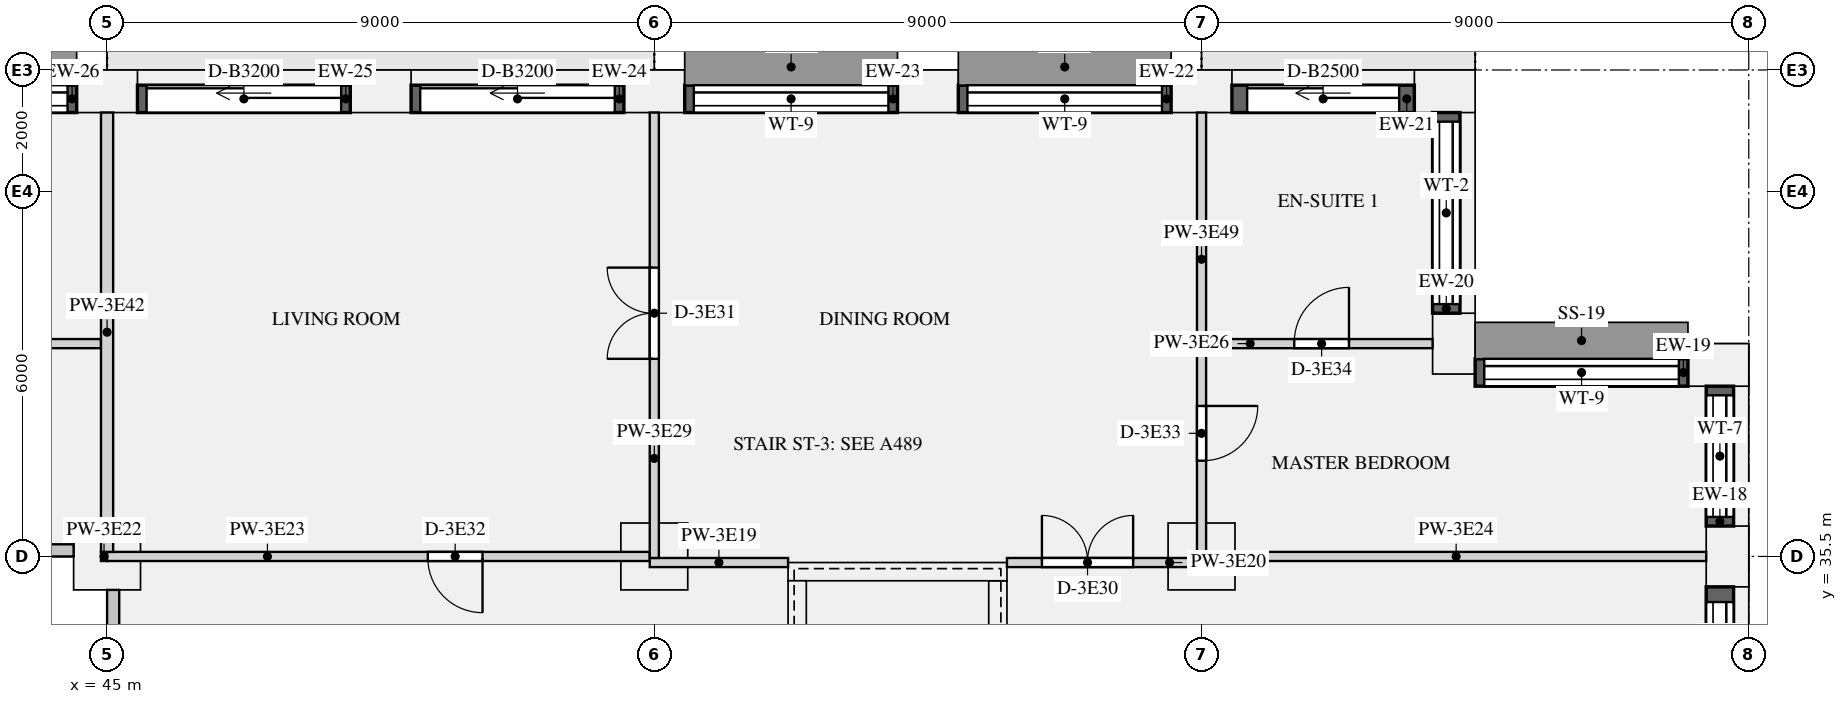
"""IFC4 building model, lengths in metres.
Left out: names, types, materials, properties, quantities, classifications, styles, units other than length and angle.
Written with IfcOpenShell. Run it as: python <this file> out.ifc"""

import sys

from ifc_helpers import new_model, si_unit, direction, frame, frame_2d, origin, origin_2d, place, context, subcontext, project, spatial, rectangle, extrude, element, fill, save


model = new_model("IFC4")
c1 = context("Model", 3, precision=1e-05, world=origin(), true_north=direction((0.0, 1.0)))
c2 = subcontext(c1, "Body", "Model", "MODEL_VIEW")
j1 = project(units=[si_unit("LENGTHUNIT", "METRE"), si_unit("PLANEANGLEUNIT", "RADIAN")], contexts=[c1])
p1 = place(None, origin())
s1 = spatial("IfcSite", under=j1, at=p1, CompositionType="ELEMENT")
p2 = place(p1, origin())
s2 = spatial("IfcBuilding", under=s1, at=p2, CompositionType="ELEMENT")
p3 = place(p2, frame((0.0, 0.0, 172.8)))
s3 = spatial("IfcBuildingStorey", under=s2, at=p3, CompositionType="ELEMENT", Elevation=172.8)
for number, where, z_axis, x_axis in (
    (1, (71.65, 35.5, 0.0), (0.0, 0.0, 1.0), (0.0, 1.0, 0.0)),
    (2, (71.5, 38.65, 0.0), (0.0, 0.0, 1.0), (-1.0, 0.0, 0.0)),
    (3, (67.15, 39.0, 0.0), (0.0, 0.0, 1.0), (0.0, 1.0, 0.0)),
    (4, (67.0, 43.15, 0.0), (0.0, 0.0, 1.0), (-1.0, 0.0, 0.0)),
    (5, (63.0, 43.15, 0.0), (0.0, 0.0, 1.0), (-1.0, 0.0, 0.0)),
    (6, (58.5, 43.15, 0.0), (0.0, 0.0, 1.0), (-1.0, 0.0, 0.0)),
    (7, (54.0, 43.15, 0.0), (0.0, 0.0, 1.0), (-1.0, 0.0, 0.0)),
    (8, (49.5, 43.15, 0.0), (0.0, 0.0, 1.0), (-1.0, 0.0, 0.0)),
    (9, (45.0, 43.15, 0.0), (0.0, 0.0, 1.0), (-1.0, 0.0, 0.0)),
):
    element("IfcColumn", number, at=place(p3, frame(where, z_axis=z_axis, x_axis=x_axis)), inside=s3, PredefinedType="USERDEFINED", context=c2, shape_type="SweptSolid", body=[
        extrude(rectangle(XDim=1.0, YDim=0.7, at=origin_2d()), origin(), (0.0, 0.0, 1.0), 3.15),
    ])
for number, where, z_axis, x_axis in (
    (10, (45.0, 35.5, 0.0), (0.0, 0.0, 1.0), (1.0, 0.0, 0.0)),
    (11, (54.0, 35.5, 0.0), (0.0, 0.0, 1.0), (1.0, 0.0, 0.0)),
    (12, (63.0, 35.5, 0.0), (0.0, 0.0, 1.0), (1.0, 0.0, 0.0)),
):
    element("IfcColumn", number, at=place(p3, frame(where, z_axis=z_axis, x_axis=x_axis)), inside=s3, PredefinedType="COLUMN", context=c2, shape_type="SweptSolid", body=[
        extrude(rectangle(XDim=1.1, YDim=1.1, at=origin_2d()), origin(), (0.0, 0.0, 1.0), 3.15),
    ])
p4 = place(p3, frame((56.2, 35.25, 0.0), z_axis=(0.0, 0.0, 1.0), x_axis=(1.0, 0.0, 0.0)))
e13 = element("IfcWall", 13, at=p4, inside=s3, PredefinedType="SHEAR", context=c2, shape_type="SweptSolid", body=[
    extrude(rectangle(XDim=3.6, YDim=0.3, at=frame_2d((1.8, 0.0))), origin(), (0.0, 0.0, 1.0), 3.15),
])
for number, where, z_axis, x_axis in (
    (14, (56.35, 27.3, 0.0), (0.0, 0.0, 1.0), (0.0, 1.0, 0.0)),
    (15, (59.65, 27.3, 0.0), (0.0, 0.0, 1.0), (0.0, 1.0, 0.0)),
):
    element("IfcWall", number, at=place(p3, frame(where, z_axis=z_axis, x_axis=x_axis)), inside=s3, PredefinedType="SHEAR", context=c2, shape_type="SweptSolid", body=[
        extrude(rectangle(XDim=7.8, YDim=0.3, at=frame_2d((3.9, 0.0))), origin(), (0.0, 0.0, 1.0), 3.15),
    ])
p5 = place(p3, frame((71.525, 32.5, 0.9), z_axis=(0.0, 0.0, 1.0), x_axis=(0.0, 1.0, 0.0)))
e16 = element("IfcWall", 16, at=p5, inside=s3, PredefinedType="SOLIDWALL", context=c2, shape_type="SweptSolid", body=[
    extrude(rectangle(XDim=2.5, YDim=0.45, at=frame_2d((1.25, 0.0))), origin(), (0.0, 0.0, 1.0), 1.93),
])
p6 = place(p5, frame((0.25, 0.0, 0.15)))
e17 = element("IfcOpeningElement", 17, at=p6, cuts=e16, PredefinedType="OPENING", context=c2, shape_type="SweptSolid", body=[
    extrude(rectangle(XDim=2.0, YDim=1.5, at=frame_2d((1.0, 0.75))), frame((0.0, 0.235, 0.0), z_axis=(0.0, -1.0, 0.0), x_axis=(1.0, 0.0, 0.0)), (0.0, 0.0, 1.0), 0.47),
])
p7 = place(p3, frame((71.525, 36.0, 0.9), z_axis=(0.0, 0.0, 1.0), x_axis=(0.0, 1.0, 0.0)))
e18 = element("IfcWall", 18, at=p7, inside=s3, PredefinedType="SOLIDWALL", context=c2, shape_type="SweptSolid", body=[
    extrude(rectangle(XDim=2.3, YDim=0.45, at=frame_2d((1.15, 0.0))), origin(), (0.0, 0.0, 1.0), 1.93),
])
p8 = place(p7, frame((0.15, 0.0, 0.15)))
e19 = element("IfcOpeningElement", 19, at=p8, cuts=e18, PredefinedType="OPENING", context=c2, shape_type="SweptSolid", body=[
    extrude(rectangle(XDim=2.0, YDim=1.5, at=frame_2d((1.0, 0.75))), frame((0.0, 0.235, 0.0), z_axis=(0.0, -1.0, 0.0), x_axis=(1.0, 0.0, 0.0)), (0.0, 0.0, 1.0), 0.47),
])
p9 = place(p3, frame((71.0, 38.525, 0.9), z_axis=(0.0, 0.0, 1.0), x_axis=(-1.0, 0.0, 0.0)))
e20 = element("IfcWall", 20, at=p9, inside=s3, PredefinedType="SOLIDWALL", context=c2, shape_type="SweptSolid", body=[
    extrude(rectangle(XDim=3.5, YDim=0.45, at=frame_2d((1.75, 0.0))), origin(), (0.0, 0.0, 1.0), 1.93),
])
p10 = place(p9, frame((0.15, 0.0, 0.15)))
e21 = element("IfcOpeningElement", 21, at=p10, cuts=e20, PredefinedType="OPENING", context=c2, shape_type="SweptSolid", body=[
    extrude(rectangle(XDim=3.2, YDim=1.5, at=frame_2d((1.6, 0.75))), frame((0.0, 0.235, 0.0), z_axis=(0.0, -1.0, 0.0), x_axis=(1.0, 0.0, 0.0)), (0.0, 0.0, 1.0), 0.47),
])
p11 = place(p3, frame((67.025, 39.5, 0.9), z_axis=(0.0, 0.0, 1.0), x_axis=(0.0, 1.0, 0.0)))
e22 = element("IfcWall", 22, at=p11, inside=s3, PredefinedType="SOLIDWALL", context=c2, shape_type="SweptSolid", body=[
    extrude(rectangle(XDim=3.3, YDim=0.45, at=frame_2d((1.65, 0.0))), origin(), (0.0, 0.0, 1.0), 1.93),
])
p12 = place(p11, frame((0.15, 0.0, 0.15)))
e23 = element("IfcOpeningElement", 23, at=p12, cuts=e22, PredefinedType="OPENING", context=c2, shape_type="SweptSolid", body=[
    extrude(rectangle(XDim=3.0, YDim=1.5, at=frame_2d((1.5, 0.75))), frame((0.0, 0.235, 0.0), z_axis=(0.0, -1.0, 0.0), x_axis=(1.0, 0.0, 0.0)), (0.0, 0.0, 1.0), 0.47),
])
p13 = place(p3, frame((66.5, 43.025, 0.0), z_axis=(0.0, 0.0, 1.0), x_axis=(-1.0, 0.0, 0.0)))
e24 = element("IfcWall", 24, at=p13, inside=s3, PredefinedType="SOLIDWALL", context=c2, shape_type="SweptSolid", body=[
    extrude(rectangle(XDim=3.0, YDim=0.45, at=frame_2d((1.5, 0.0))), origin(), (0.0, 0.0, 1.0), 2.83),
])
p14 = place(p13, frame((0.25, 0.0, 0.0)))
e25 = element("IfcOpeningElement", 25, at=p14, cuts=e24, PredefinedType="OPENING", context=c2, shape_type="SweptSolid", body=[
    extrude(rectangle(XDim=2.5, YDim=2.3, at=frame_2d((1.25, 1.15))), frame((0.0, 0.235, 0.0), z_axis=(0.0, -1.0, 0.0), x_axis=(1.0, 0.0, 0.0)), (0.0, 0.0, 1.0), 0.47),
])
p15 = place(p3, frame((62.5, 43.025, 0.9), z_axis=(0.0, 0.0, 1.0), x_axis=(-1.0, 0.0, 0.0)))
e26 = element("IfcWall", 26, at=p15, inside=s3, PredefinedType="SOLIDWALL", context=c2, shape_type="SweptSolid", body=[
    extrude(rectangle(XDim=3.5, YDim=0.45, at=frame_2d((1.75, 0.0))), origin(), (0.0, 0.0, 1.0), 1.93),
])
p16 = place(p15, frame((0.15, 0.0, 0.15)))
e27 = element("IfcOpeningElement", 27, at=p16, cuts=e26, PredefinedType="OPENING", context=c2, shape_type="SweptSolid", body=[
    extrude(rectangle(XDim=3.2, YDim=1.5, at=frame_2d((1.6, 0.75))), frame((0.0, 0.235, 0.0), z_axis=(0.0, -1.0, 0.0), x_axis=(1.0, 0.0, 0.0)), (0.0, 0.0, 1.0), 0.47),
])
p17 = place(p3, frame((58.0, 43.025, 0.9), z_axis=(0.0, 0.0, 1.0), x_axis=(-1.0, 0.0, 0.0)))
e28 = element("IfcWall", 28, at=p17, inside=s3, PredefinedType="SOLIDWALL", context=c2, shape_type="SweptSolid", body=[
    extrude(rectangle(XDim=3.5, YDim=0.45, at=frame_2d((1.75, 0.0))), origin(), (0.0, 0.0, 1.0), 1.93),
])
p18 = place(p17, frame((0.15, 0.0, 0.15)))
e29 = element("IfcOpeningElement", 29, at=p18, cuts=e28, PredefinedType="OPENING", context=c2, shape_type="SweptSolid", body=[
    extrude(rectangle(XDim=3.2, YDim=1.5, at=frame_2d((1.6, 0.75))), frame((0.0, 0.235, 0.0), z_axis=(0.0, -1.0, 0.0), x_axis=(1.0, 0.0, 0.0)), (0.0, 0.0, 1.0), 0.47),
])
p19 = place(p3, frame((53.5, 43.025, 0.0), z_axis=(0.0, 0.0, 1.0), x_axis=(-1.0, 0.0, 0.0)))
e30 = element("IfcWall", 30, at=p19, inside=s3, PredefinedType="SOLIDWALL", context=c2, shape_type="SweptSolid", body=[
    extrude(rectangle(XDim=3.5, YDim=0.45, at=frame_2d((1.75, 0.0))), origin(), (0.0, 0.0, 1.0), 2.83),
])
p20 = place(p19, frame((0.15, 0.0, 0.0)))
e31 = element("IfcOpeningElement", 31, at=p20, cuts=e30, PredefinedType="OPENING", context=c2, shape_type="SweptSolid", body=[
    extrude(rectangle(XDim=3.2, YDim=2.3, at=frame_2d((1.6, 1.15))), frame((0.0, 0.235, 0.0), z_axis=(0.0, -1.0, 0.0), x_axis=(1.0, 0.0, 0.0)), (0.0, 0.0, 1.0), 0.47),
])
p21 = place(p3, frame((49.0, 43.025, 0.0), z_axis=(0.0, 0.0, 1.0), x_axis=(-1.0, 0.0, 0.0)))
e32 = element("IfcWall", 32, at=p21, inside=s3, PredefinedType="SOLIDWALL", context=c2, shape_type="SweptSolid", body=[
    extrude(rectangle(XDim=3.5, YDim=0.45, at=frame_2d((1.75, 0.0))), origin(), (0.0, 0.0, 1.0), 2.83),
])
p22 = place(p21, frame((0.15, 0.0, 0.0)))
e33 = element("IfcOpeningElement", 33, at=p22, cuts=e32, PredefinedType="OPENING", context=c2, shape_type="SweptSolid", body=[
    extrude(rectangle(XDim=3.2, YDim=2.3, at=frame_2d((1.6, 1.15))), frame((0.0, 0.235, 0.0), z_axis=(0.0, -1.0, 0.0), x_axis=(1.0, 0.0, 0.0)), (0.0, 0.0, 1.0), 0.47),
])
p23 = place(p3, frame((44.5, 43.025, 0.9), z_axis=(0.0, 0.0, 1.0), x_axis=(-1.0, 0.0, 0.0)))
e34 = element("IfcWall", 34, at=p23, inside=s3, PredefinedType="SOLIDWALL", context=c2, shape_type="SweptSolid", body=[
    extrude(rectangle(XDim=3.5, YDim=0.45, at=frame_2d((1.75, 0.0))), origin(), (0.0, 0.0, 1.0), 1.93),
])
p24 = place(p23, frame((0.15, 0.0, 0.15)))
e35 = element("IfcOpeningElement", 35, at=p24, cuts=e34, PredefinedType="OPENING", context=c2, shape_type="SweptSolid", body=[
    extrude(rectangle(XDim=3.2, YDim=1.5, at=frame_2d((1.6, 0.75))), frame((0.0, 0.235, 0.0), z_axis=(0.0, -1.0, 0.0), x_axis=(1.0, 0.0, 0.0)), (0.0, 0.0, 1.0), 0.47),
])
p25 = place(p3, frame((53.925, 35.4, 0.0), z_axis=(0.0, 0.0, 1.0), x_axis=(1.0, 0.0, 0.0)))
e36 = element("IfcWall", 36, at=p25, inside=s3, PredefinedType="PARTITIONING", context=c2, shape_type="SweptSolid", body=[
    extrude(rectangle(XDim=2.275, YDim=0.15, at=frame_2d((1.137, 0.0))), origin(), (0.0, 0.0, 1.0), 2.83),
])
p26 = place(p3, frame((59.8, 35.4, 0.0), z_axis=(0.0, 0.0, 1.0), x_axis=(1.0, 0.0, 0.0)))
e37 = element("IfcWall", 37, at=p26, inside=s3, PredefinedType="PARTITIONING", context=c2, shape_type="SweptSolid", body=[
    extrude(rectangle(XDim=3.275, YDim=0.15, at=frame_2d((1.637, 0.0))), origin(), (0.0, 0.0, 1.0), 2.83),
])
p27 = place(p26, frame((0.575, 0.0, 0.0)))
e38 = element("IfcOpeningElement", 38, at=p27, cuts=e37, PredefinedType="OPENING", context=c2, shape_type="SweptSolid", body=[
    extrude(rectangle(XDim=1.5, YDim=2.1, at=frame_2d((0.75, 1.05))), frame((0.0, 0.085, 0.0), z_axis=(0.0, -1.0, 0.0), x_axis=(1.0, 0.0, 0.0)), (0.0, 0.0, 1.0), 0.17),
])
p28 = place(p3, frame((44.9, 35.5, 0.0), z_axis=(0.0, 0.0, 1.0), x_axis=(1.0, 0.0, 0.0)))
e39 = element("IfcWall", 39, at=p28, inside=s3, PredefinedType="PARTITIONING", context=c2, shape_type="SweptSolid", body=[
    extrude(rectangle(XDim=0.1, YDim=0.15, at=frame_2d((0.05, 0.0))), origin(), (0.0, 0.0, 1.0), 2.83),
])
p29 = place(p3, frame((45.0, 35.5, 0.0), z_axis=(0.0, 0.0, 1.0), x_axis=(1.0, 0.0, 0.0)))
e40 = element("IfcWall", 40, at=p29, inside=s3, PredefinedType="PARTITIONING", context=c2, shape_type="SweptSolid", body=[
    extrude(rectangle(XDim=8.925, YDim=0.15, at=frame_2d((4.462, 0.0))), origin(), (0.0, 0.0, 1.0), 2.83),
])
p30 = place(p29, frame((5.275, 0.0, 0.0)))
e41 = element("IfcOpeningElement", 41, at=p30, cuts=e40, PredefinedType="OPENING", context=c2, shape_type="SweptSolid", body=[
    extrude(rectangle(XDim=0.9, YDim=2.1, at=frame_2d((0.45, 1.05))), frame((0.0, 0.085, 0.0), z_axis=(0.0, -1.0, 0.0), x_axis=(1.0, 0.0, 0.0)), (0.0, 0.0, 1.0), 0.17),
])
p31 = place(p3, frame((63.075, 35.5, 0.0), z_axis=(0.0, 0.0, 1.0), x_axis=(1.0, 0.0, 0.0)))
e42 = element("IfcWall", 42, at=p31, inside=s3, PredefinedType="PARTITIONING", context=c2, shape_type="SweptSolid", body=[
    extrude(rectangle(XDim=8.225, YDim=0.15, at=frame_2d((4.113, 0.0))), origin(), (0.0, 0.0, 1.0), 2.83),
])
p32 = place(p3, frame((36.075, 39.0, 0.0), z_axis=(0.0, 0.0, 1.0), x_axis=(1.0, 0.0, 0.0)))
e43 = element("IfcWall", 43, at=p32, inside=s3, PredefinedType="PARTITIONING", context=c2, shape_type="SweptSolid", body=[
    extrude(rectangle(XDim=8.825, YDim=0.15, at=frame_2d((4.413, 0.0))), origin(), (0.0, 0.0, 1.0), 2.83),
])
p33 = place(p32, frame((1.725, 0.0, 0.0)))
e44 = element("IfcOpeningElement", 44, at=p33, cuts=e43, PredefinedType="OPENING", context=c2, shape_type="SweptSolid", body=[
    extrude(rectangle(XDim=0.9, YDim=2.1, at=frame_2d((0.45, 1.05))), frame((0.0, 0.085, 0.0), z_axis=(0.0, -1.0, 0.0), x_axis=(1.0, 0.0, 0.0)), (0.0, 0.0, 1.0), 0.17),
])
p34 = place(p32, frame((6.225, 0.0, 0.0)))
e45 = element("IfcOpeningElement", 45, at=p34, cuts=e43, PredefinedType="OPENING", context=c2, shape_type="SweptSolid", body=[
    extrude(rectangle(XDim=0.9, YDim=2.1, at=frame_2d((0.45, 1.05))), frame((0.0, 0.085, 0.0), z_axis=(0.0, -1.0, 0.0), x_axis=(1.0, 0.0, 0.0)), (0.0, 0.0, 1.0), 0.17),
])
p35 = place(p3, frame((63.075, 39.0, 0.0), z_axis=(0.0, 0.0, 1.0), x_axis=(1.0, 0.0, 0.0)))
e46 = element("IfcWall", 46, at=p35, inside=s3, PredefinedType="PARTITIONING", context=c2, shape_type="SweptSolid", body=[
    extrude(rectangle(XDim=3.725, YDim=0.15, at=frame_2d((1.863, 0.0))), origin(), (0.0, 0.0, 1.0), 2.83),
])
p36 = place(p35, frame((1.45, 0.0, 0.0)))
e47 = element("IfcOpeningElement", 47, at=p36, cuts=e46, PredefinedType="OPENING", context=c2, shape_type="SweptSolid", body=[
    extrude(rectangle(XDim=0.9, YDim=2.1, at=frame_2d((0.45, 1.05))), frame((0.0, 0.085, 0.0), z_axis=(0.0, -1.0, 0.0), x_axis=(1.0, 0.0, 0.0)), (0.0, 0.0, 1.0), 0.17),
])
p37 = place(p3, frame((54.0, 35.475, 0.0), z_axis=(0.0, 0.0, 1.0), x_axis=(0.0, 1.0, 0.0)))
e48 = element("IfcWall", 48, at=p37, inside=s3, PredefinedType="PARTITIONING", context=c2, shape_type="SweptSolid", body=[
    extrude(rectangle(XDim=7.325, YDim=0.15, at=frame_2d((3.663, 0.0))), origin(), (0.0, 0.0, 1.0), 2.83),
])
p38 = place(p37, frame((3.275, 0.0, 0.0)))
e49 = element("IfcOpeningElement", 49, at=p38, cuts=e48, PredefinedType="OPENING", context=c2, shape_type="SweptSolid", body=[
    extrude(rectangle(XDim=1.5, YDim=2.1, at=frame_2d((0.75, 1.05))), frame((0.0, 0.085, 0.0), z_axis=(0.0, -1.0, 0.0), x_axis=(1.0, 0.0, 0.0)), (0.0, 0.0, 1.0), 0.17),
])
p39 = place(p3, frame((45.0, 35.575, 0.0), z_axis=(0.0, 0.0, 1.0), x_axis=(0.0, 1.0, 0.0)))
e50 = element("IfcWall", 50, at=p39, inside=s3, PredefinedType="PARTITIONING", context=c2, shape_type="SweptSolid", body=[
    extrude(rectangle(XDim=7.225, YDim=0.2, at=frame_2d((3.613, 0.0))), origin(), (0.0, 0.0, 1.0), 2.83),
])
p40 = place(p3, frame((63.0, 35.475, 0.0), z_axis=(0.0, 0.0, 1.0), x_axis=(0.0, 1.0, 0.0)))
e51 = element("IfcWall", 51, at=p40, inside=s3, PredefinedType="PARTITIONING", context=c2, shape_type="SweptSolid", body=[
    extrude(rectangle(XDim=7.325, YDim=0.15, at=frame_2d((3.663, 0.0))), origin(), (0.0, 0.0, 1.0), 2.83),
])
p41 = place(p40, frame((1.6, 0.0, 0.0)))
e52 = element("IfcOpeningElement", 52, at=p41, cuts=e51, PredefinedType="OPENING", context=c2, shape_type="SweptSolid", body=[
    extrude(rectangle(XDim=0.9, YDim=2.1, at=frame_2d((0.45, 1.05))), frame((0.0, 0.085, 0.0), z_axis=(0.0, -1.0, 0.0), x_axis=(1.0, 0.0, 0.0)), (0.0, 0.0, 1.0), 0.17),
])
p42 = place(p6, origin())
e53 = element("IfcWindow", 53, at=p42, inside=s3, PartitioningType="SINGLE_PANEL", PredefinedType="WINDOW", context=c2, shape_type="SweptSolid", body=[
    extrude(rectangle(XDim=2.0, YDim=1.5, at=frame_2d((1.0, 0.75))), frame((0.0, -0.065, 0.0), z_axis=(0.0, -1.0, 0.0), x_axis=(1.0, 0.0, 0.0)), (0.0, 0.0, 1.0), 0.06),
])
fill(e17, e53)
p43 = place(p8, origin())
e54 = element("IfcWindow", 54, at=p43, inside=s3, PartitioningType="SINGLE_PANEL", PredefinedType="WINDOW", context=c2, shape_type="SweptSolid", body=[
    extrude(rectangle(XDim=2.0, YDim=1.5, at=frame_2d((1.0, 0.75))), frame((0.0, -0.065, 0.0), z_axis=(0.0, -1.0, 0.0), x_axis=(1.0, 0.0, 0.0)), (0.0, 0.0, 1.0), 0.06),
])
fill(e19, e54)
p44 = place(p10, origin())
e55 = element("IfcWindow", 55, at=p44, inside=s3, PartitioningType="SINGLE_PANEL", PredefinedType="WINDOW", context=c2, shape_type="SweptSolid", body=[
    extrude(rectangle(XDim=3.2, YDim=1.5, at=frame_2d((1.6, 0.75))), frame((0.0, -0.065, 0.0), z_axis=(0.0, -1.0, 0.0), x_axis=(1.0, 0.0, 0.0)), (0.0, 0.0, 1.0), 0.06),
])
fill(e21, e55)
p45 = place(p12, origin())
e56 = element("IfcWindow", 56, at=p45, inside=s3, PartitioningType="SINGLE_PANEL", PredefinedType="WINDOW", context=c2, shape_type="SweptSolid", body=[
    extrude(rectangle(XDim=3.0, YDim=1.5, at=frame_2d((1.5, 0.75))), frame((0.0, -0.065, 0.0), z_axis=(0.0, -1.0, 0.0), x_axis=(1.0, 0.0, 0.0)), (0.0, 0.0, 1.0), 0.06),
])
fill(e23, e56)
p46 = place(p14, origin())
e57 = element("IfcDoor", 57, at=p46, inside=s3, OperationType="SLIDING_TO_LEFT", PredefinedType="DOOR", context=c2, shape_type="SweptSolid", body=[
    extrude(rectangle(XDim=2.5, YDim=2.3, at=frame_2d((1.25, 1.15))), frame((0.0, -0.07, 0.0), z_axis=(0.0, -1.0, 0.0), x_axis=(1.0, 0.0, 0.0)), (0.0, 0.0, 1.0), 0.05),
])
fill(e25, e57)
p47 = place(p16, origin())
e58 = element("IfcWindow", 58, at=p47, inside=s3, PartitioningType="SINGLE_PANEL", PredefinedType="WINDOW", context=c2, shape_type="SweptSolid", body=[
    extrude(rectangle(XDim=3.2, YDim=1.5, at=frame_2d((1.6, 0.75))), frame((0.0, -0.065, 0.0), z_axis=(0.0, -1.0, 0.0), x_axis=(1.0, 0.0, 0.0)), (0.0, 0.0, 1.0), 0.06),
])
fill(e27, e58)
p48 = place(p18, origin())
e59 = element("IfcWindow", 59, at=p48, inside=s3, PartitioningType="SINGLE_PANEL", PredefinedType="WINDOW", context=c2, shape_type="SweptSolid", body=[
    extrude(rectangle(XDim=3.2, YDim=1.5, at=frame_2d((1.6, 0.75))), frame((0.0, -0.065, 0.0), z_axis=(0.0, -1.0, 0.0), x_axis=(1.0, 0.0, 0.0)), (0.0, 0.0, 1.0), 0.06),
])
fill(e29, e59)
p49 = place(p20, origin())
e60 = element("IfcDoor", 60, at=p49, inside=s3, OperationType="SLIDING_TO_LEFT", PredefinedType="DOOR", context=c2, shape_type="SweptSolid", body=[
    extrude(rectangle(XDim=3.2, YDim=2.3, at=frame_2d((1.6, 1.15))), frame((0.0, -0.07, 0.0), z_axis=(0.0, -1.0, 0.0), x_axis=(1.0, 0.0, 0.0)), (0.0, 0.0, 1.0), 0.05),
])
fill(e31, e60)
p50 = place(p22, origin())
e61 = element("IfcDoor", 61, at=p50, inside=s3, OperationType="SLIDING_TO_LEFT", PredefinedType="DOOR", context=c2, shape_type="SweptSolid", body=[
    extrude(rectangle(XDim=3.2, YDim=2.3, at=frame_2d((1.6, 1.15))), frame((0.0, -0.07, 0.0), z_axis=(0.0, -1.0, 0.0), x_axis=(1.0, 0.0, 0.0)), (0.0, 0.0, 1.0), 0.05),
])
fill(e33, e61)
p51 = place(p24, origin())
e62 = element("IfcWindow", 62, at=p51, inside=s3, PartitioningType="SINGLE_PANEL", PredefinedType="WINDOW", context=c2, shape_type="SweptSolid", body=[
    extrude(rectangle(XDim=3.2, YDim=1.5, at=frame_2d((1.6, 0.75))), frame((0.0, -0.065, 0.0), z_axis=(0.0, -1.0, 0.0), x_axis=(1.0, 0.0, 0.0)), (0.0, 0.0, 1.0), 0.06),
])
fill(e35, e62)
p52 = place(p27, origin())
e63 = element("IfcDoor", 63, at=p52, inside=s3, OperationType="DOUBLE_DOOR_SINGLE_SWING", PredefinedType="DOOR", context=c2, shape_type="SweptSolid", body=[
    extrude(rectangle(XDim=1.5, YDim=2.1, at=frame_2d((0.75, 1.05))), frame((0.0, 0.025, 0.0), z_axis=(0.0, -1.0, 0.0), x_axis=(1.0, 0.0, 0.0)), (0.0, 0.0, 1.0), 0.05),
])
fill(e38, e63)
p53 = place(p38, origin())
e64 = element("IfcDoor", 64, at=p53, inside=s3, OperationType="DOUBLE_DOOR_SINGLE_SWING", PredefinedType="DOOR", context=c2, shape_type="SweptSolid", body=[
    extrude(rectangle(XDim=1.5, YDim=2.1, at=frame_2d((0.75, 1.05))), frame((0.0, 0.025, 0.0), z_axis=(0.0, -1.0, 0.0), x_axis=(1.0, 0.0, 0.0)), (0.0, 0.0, 1.0), 0.05),
])
fill(e49, e64)
p54 = place(p30, frame((0.9, 0.0, 0.0), z_axis=(0.0, 0.0, 1.0), x_axis=(-1.0, 0.0, 0.0)))
e65 = element("IfcDoor", 65, at=p54, inside=s3, OperationType="SINGLE_SWING_LEFT", PredefinedType="DOOR", context=c2, shape_type="SweptSolid", body=[
    extrude(rectangle(XDim=0.9, YDim=2.1, at=frame_2d((0.45, 1.05))), frame((0.0, 0.025, 0.0), z_axis=(0.0, -1.0, 0.0), x_axis=(1.0, 0.0, 0.0)), (0.0, 0.0, 1.0), 0.05),
])
fill(e41, e65)
p55 = place(p41, frame((0.9, 0.0, 0.0), z_axis=(0.0, 0.0, 1.0), x_axis=(-1.0, 0.0, 0.0)))
e66 = element("IfcDoor", 66, at=p55, inside=s3, OperationType="SINGLE_SWING_LEFT", PredefinedType="DOOR", context=c2, shape_type="SweptSolid", body=[
    extrude(rectangle(XDim=0.9, YDim=2.1, at=frame_2d((0.45, 1.05))), frame((0.0, 0.025, 0.0), z_axis=(0.0, -1.0, 0.0), x_axis=(1.0, 0.0, 0.0)), (0.0, 0.0, 1.0), 0.05),
])
fill(e52, e66)
p56 = place(p36, origin())
e67 = element("IfcDoor", 67, at=p56, inside=s3, OperationType="SINGLE_SWING_RIGHT", PredefinedType="DOOR", context=c2, shape_type="SweptSolid", body=[
    extrude(rectangle(XDim=0.9, YDim=2.1, at=frame_2d((0.45, 1.05))), frame((0.0, 0.025, 0.0), z_axis=(0.0, -1.0, 0.0), x_axis=(1.0, 0.0, 0.0)), (0.0, 0.0, 1.0), 0.05),
])
fill(e47, e67)
save(model, sys.argv[1])
